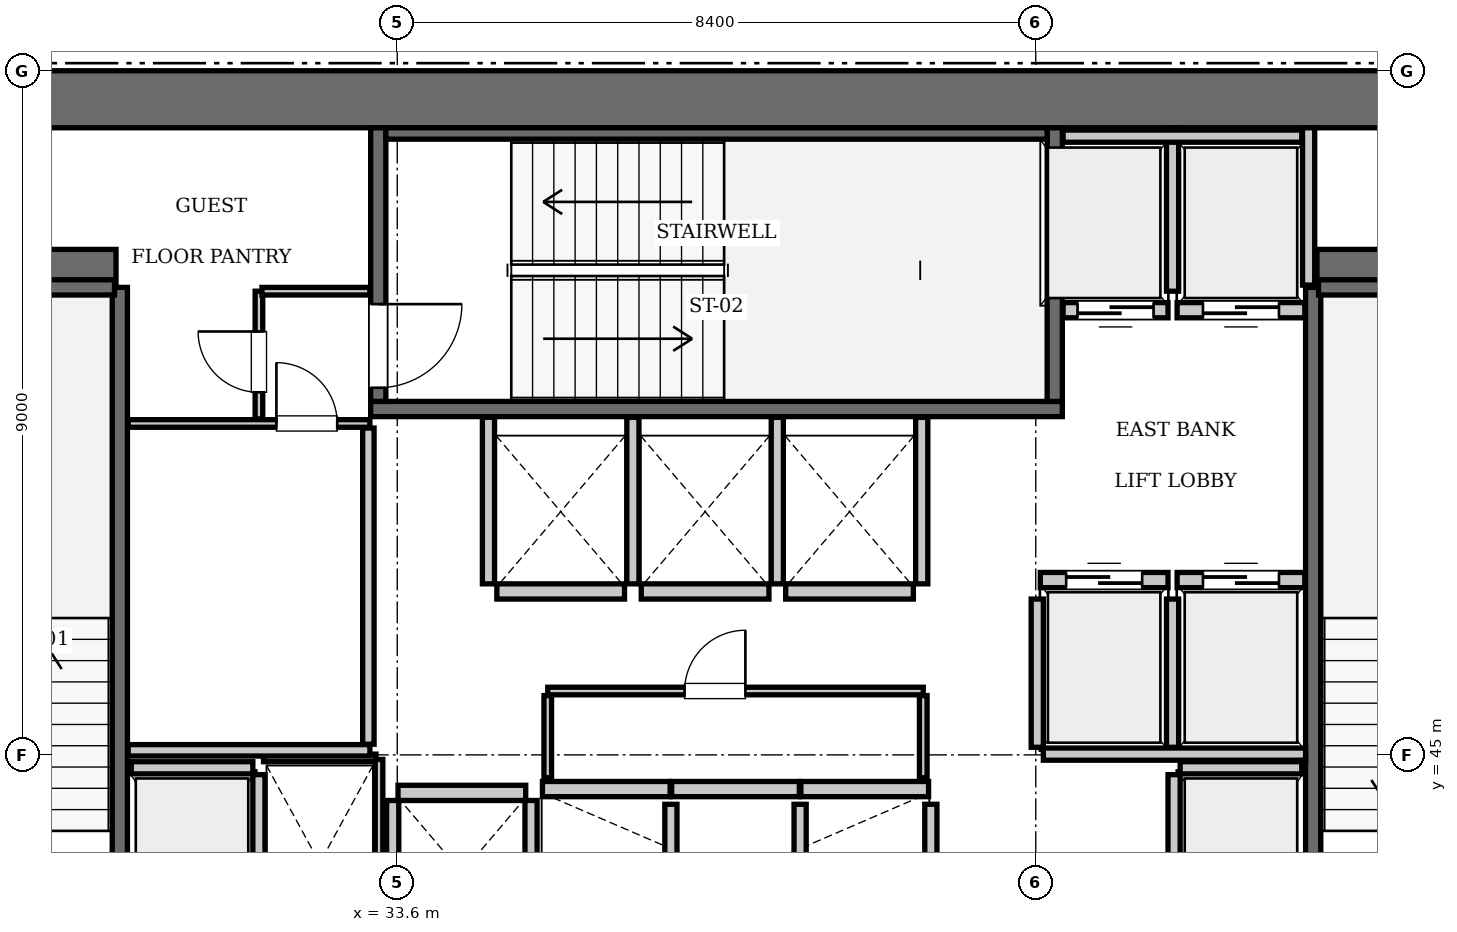
"""IFC4 building model, lengths in metres.
Left out: names, types, materials, properties, quantities, classifications, styles, units other than length and angle.
Written with IfcOpenShell. Run it as: python <this file> out.ifc"""

import sys

from ifc_helpers import new_model, si_unit, direction, frame, frame_2d, origin, place, context, subcontext, project, spatial, rectangle, extrude, element, fill, save


model = new_model("IFC4")
c1 = context("Model", 3, precision=1e-05, world=origin(), true_north=direction((0.0, 1.0)))
c2 = subcontext(c1, "Body", "Model", "MODEL_VIEW")
j1 = project(units=[si_unit("LENGTHUNIT", "METRE"), si_unit("PLANEANGLEUNIT", "RADIAN")], contexts=[c1])
p1 = place(None, origin())
s1 = spatial("IfcSite", under=j1, at=p1, CompositionType="ELEMENT")
p2 = place(p1, origin())
s2 = spatial("IfcBuilding", under=s1, at=p2, CompositionType="ELEMENT")
p3 = place(p2, frame((0.0, 0.0, 196.7)))
s3 = spatial("IfcBuildingStorey", under=s2, at=p3, CompositionType="ELEMENT", Elevation=196.7)
p4 = place(p3, frame((25.2, 53.625, 0.0), z_axis=(0.0, 0.0, 1.0), x_axis=(1.0, 0.0, 0.0)))
e1 = element("IfcWall", 1, at=p4, inside=s3, PredefinedType="SHEAR", context=c2, shape_type="SweptSolid", body=[
    extrude(rectangle(XDim=25.2, YDim=0.75, at=frame_2d((12.6, 0.0))), origin(), (0.0, 0.0, 1.0), 3.85),
])
for number, where, z_axis, x_axis in (
    (2, (25.95, 51.4, 0.0), (0.0, 0.0, 1.0), (1.0, 0.0, 0.0)),
    (3, (45.7, 51.4, 0.0), (0.0, 0.0, 1.0), (1.0, 0.0, 0.0)),
):
    element("IfcWall", number, at=place(p3, frame(where, z_axis=z_axis, x_axis=x_axis)), inside=s3, PredefinedType="SHEAR", context=c2, shape_type="SweptSolid", body=[
        extrude(rectangle(XDim=3.95, YDim=0.5, at=frame_2d((1.975, 0.0))), origin(), (0.0, 0.0, 1.0), 3.85),
    ])
p5 = place(p3, frame((29.95, 42.15, 0.0), z_axis=(0.0, 0.0, 1.0), x_axis=(0.0, 1.0, 0.0)))
e4 = element("IfcWall", 4, at=p5, inside=s3, PredefinedType="SOLIDWALL", context=c2, shape_type="SweptSolid", body=[
    extrude(rectangle(XDim=9.0, YDim=0.2, at=frame_2d((4.5, 0.0))), origin(), (0.0, 0.0, 1.0), 3.61),
])
p6 = place(p3, frame((26.38, 51.15, 0.0), z_axis=(0.0, 0.0, 1.0), x_axis=(1.0, 0.0, 0.0)))
e5 = element("IfcWall", 5, at=p6, inside=s3, PredefinedType="SOLIDWALL", context=c2, shape_type="SweptSolid", body=[
    extrude(rectangle(XDim=3.5, YDim=0.2, at=frame_2d((1.75, 0.0))), origin(), (0.0, 0.0, 1.0), 3.61),
])
p7 = place(p3, frame((33.25, 49.55, 0.0), z_axis=(0.0, 0.0, 1.0), x_axis=(1.0, 0.0, 0.0)))
e6 = element("IfcWall", 6, at=p7, inside=s3, PredefinedType="SOLIDWALL", context=c2, shape_type="SweptSolid", body=[
    extrude(rectangle(XDim=9.1, YDim=0.2, at=frame_2d((4.55, 0.0))), origin(), (0.0, 0.0, 1.0), 3.61),
])
p8 = place(p3, frame((42.25, 49.65, 0.0), z_axis=(0.0, 0.0, 1.0), x_axis=(0.0, 1.0, 0.0)))
e7 = element("IfcWall", 7, at=p8, inside=s3, PredefinedType="SOLIDWALL", context=c2, shape_type="SweptSolid", body=[
    extrude(rectangle(XDim=3.6, YDim=0.2, at=frame_2d((1.8, 0.0))), origin(), (0.0, 0.0, 1.0), 3.61),
])
p9 = place(p3, frame((33.35, 49.65, 0.0), z_axis=(0.0, 0.0, 1.0), x_axis=(0.0, 1.0, 0.0)))
e8 = element("IfcWall", 8, at=p9, inside=s3, PredefinedType="SOLIDWALL", context=c2, shape_type="SweptSolid", body=[
    extrude(rectangle(XDim=3.6, YDim=0.2, at=frame_2d((1.8, 0.0))), origin(), (0.0, 0.0, 1.0), 3.61),
])
p10 = place(p9, frame((0.18, 0.0, 0.0)))
e9 = element("IfcOpeningElement", 9, at=p10, cuts=e8, PredefinedType="OPENING", context=c2, shape_type="SweptSolid", body=[
    extrude(rectangle(XDim=1.1, YDim=2.15, at=frame_2d((0.55, 1.075))), frame((0.0, 0.11, 0.0), z_axis=(0.0, -1.0, 0.0), x_axis=(1.0, 0.0, 0.0)), (0.0, 0.0, 1.0), 0.22),
])
p11 = place(p3, frame((33.45, 53.175, 0.0), z_axis=(0.0, 0.0, 1.0), x_axis=(1.0, 0.0, 0.0)))
e10 = element("IfcWall", 10, at=p11, inside=s3, PredefinedType="SOLIDWALL", context=c2, shape_type="SweptSolid", body=[
    extrude(rectangle(XDim=8.7, YDim=0.15, at=frame_2d((4.35, 0.0))), origin(), (0.0, 0.0, 1.0), 3.61),
])
p12 = place(p3, frame((45.65, 42.15, 0.0), z_axis=(0.0, 0.0, 1.0), x_axis=(0.0, 1.0, 0.0)))
e11 = element("IfcWall", 11, at=p12, inside=s3, PredefinedType="SOLIDWALL", context=c2, shape_type="SweptSolid", body=[
    extrude(rectangle(XDim=9.0, YDim=0.2, at=frame_2d((4.5, 0.0))), origin(), (0.0, 0.0, 1.0), 3.61),
])
p13 = place(p3, frame((45.72, 51.15, 0.0), z_axis=(0.0, 0.0, 1.0), x_axis=(1.0, 0.0, 0.0)))
e12 = element("IfcWall", 12, at=p13, inside=s3, PredefinedType="SOLIDWALL", context=c2, shape_type="SweptSolid", body=[
    extrude(rectangle(XDim=3.5, YDim=0.2, at=frame_2d((1.75, 0.0))), origin(), (0.0, 0.0, 1.0), 3.61),
])
p14 = place(p3, frame((42.06, 47.3, 0.0), z_axis=(0.0, 0.0, 1.0), x_axis=(1.0, 0.0, 0.0)))
e13 = element("IfcWall", 13, at=p14, inside=s3, PredefinedType="SOLIDWALL", context=c2, shape_type="SweptSolid", body=[
    extrude(rectangle(XDim=1.68, YDim=0.2, at=frame_2d((0.84, 0.0))), origin(), (0.0, 0.0, 1.0), 3.61),
])
p15 = place(p14, frame((0.34, 0.0, 0.0)))
e14 = element("IfcOpeningElement", 14, at=p15, cuts=e13, PredefinedType="OPENING", context=c2, shape_type="SweptSolid", body=[
    extrude(rectangle(XDim=1.0, YDim=2.15, at=frame_2d((0.5, 1.075))), frame((0.0, 0.11, 0.0), z_axis=(0.0, -1.0, 0.0), x_axis=(1.0, 0.0, 0.0)), (0.0, 0.0, 1.0), 0.22),
])
p16 = place(p3, frame((43.86, 47.3, 0.0), z_axis=(0.0, 0.0, 1.0), x_axis=(1.0, 0.0, 0.0)))
e15 = element("IfcWall", 15, at=p16, inside=s3, PredefinedType="SOLIDWALL", context=c2, shape_type="SweptSolid", body=[
    extrude(rectangle(XDim=1.68, YDim=0.2, at=frame_2d((0.84, 0.0))), origin(), (0.0, 0.0, 1.0), 3.61),
])
p17 = place(p16, frame((0.34, 0.0, 0.0)))
e16 = element("IfcOpeningElement", 16, at=p17, cuts=e15, PredefinedType="OPENING", context=c2, shape_type="SweptSolid", body=[
    extrude(rectangle(XDim=1.0, YDim=2.15, at=frame_2d((0.5, 1.075))), frame((0.0, 0.11, 0.0), z_axis=(0.0, -1.0, 0.0), x_axis=(1.0, 0.0, 0.0)), (0.0, 0.0, 1.0), 0.22),
])
p18 = place(p3, frame((42.36, 50.85, 0.0), z_axis=(0.0, 0.0, 1.0), x_axis=(1.0, 0.0, 0.0)))
e17 = element("IfcWall", 17, at=p18, inside=s3, PredefinedType="SOLIDWALL", context=c2, shape_type="SweptSolid", body=[
    extrude(rectangle(XDim=1.38, YDim=0.2, at=frame_2d((0.69, 0.0))), origin(), (0.0, 0.0, 1.0), 3.61),
])
p19 = place(p18, frame((0.19, 0.0, 0.0)))
e18 = element("IfcOpeningElement", 18, at=p19, cuts=e17, PredefinedType="OPENING", context=c2, shape_type="SweptSolid", body=[
    extrude(rectangle(XDim=1.0, YDim=2.15, at=frame_2d((0.5, 1.075))), frame((0.0, 0.11, 0.0), z_axis=(0.0, -1.0, 0.0), x_axis=(1.0, 0.0, 0.0)), (0.0, 0.0, 1.0), 0.22),
])
p20 = place(p3, frame((43.86, 50.85, 0.0), z_axis=(0.0, 0.0, 1.0), x_axis=(1.0, 0.0, 0.0)))
e19 = element("IfcWall", 19, at=p20, inside=s3, PredefinedType="SOLIDWALL", context=c2, shape_type="SweptSolid", body=[
    extrude(rectangle(XDim=1.68, YDim=0.2, at=frame_2d((0.84, 0.0))), origin(), (0.0, 0.0, 1.0), 3.61),
])
p21 = place(p20, frame((0.34, 0.0, 0.0)))
e20 = element("IfcOpeningElement", 20, at=p21, cuts=e19, PredefinedType="OPENING", context=c2, shape_type="SweptSolid", body=[
    extrude(rectangle(XDim=1.0, YDim=2.15, at=frame_2d((0.5, 1.075))), frame((0.0, 0.11, 0.0), z_axis=(0.0, -1.0, 0.0), x_axis=(1.0, 0.0, 0.0)), (0.0, 0.0, 1.0), 0.22),
])
for number, where, z_axis, x_axis in (
    (21, (35.51, 44.55, 0.0), (0.0, 0.0, 1.0), (1.0, 0.0, 0.0)),
    (22, (37.21, 44.55, 0.0), (0.0, 0.0, 1.0), (1.0, 0.0, 0.0)),
):
    element("IfcWall", number, at=place(p3, frame(where, z_axis=z_axis, x_axis=x_axis)), inside=s3, PredefinedType="SOLIDWALL", context=c2, shape_type="SweptSolid", body=[
        extrude(rectangle(XDim=1.68, YDim=0.2, at=frame_2d((0.84, 0.0))), origin(), (0.0, 0.0, 1.0), 3.61),
    ])
for number, where, z_axis, x_axis in (
    (23, (38.91, 44.55, 0.0), (0.0, 0.0, 1.0), (1.0, 0.0, 0.0)),
    (24, (34.91, 47.15, 0.0), (0.0, 0.0, 1.0), (1.0, 0.0, 0.0)),
):
    element("IfcWall", number, at=place(p3, frame(where, z_axis=z_axis, x_axis=x_axis)), inside=s3, PredefinedType="SOLIDWALL", context=c2, shape_type="SweptSolid", body=[
        extrude(rectangle(XDim=1.68, YDim=0.2, at=frame_2d((0.84, 0.0))), origin(), (0.0, 0.0, 1.0), 3.61),
    ])
for number, where, z_axis, x_axis in (
    (25, (36.81, 47.15, 0.0), (0.0, 0.0, 1.0), (1.0, 0.0, 0.0)),
    (26, (38.71, 47.15, 0.0), (0.0, 0.0, 1.0), (1.0, 0.0, 0.0)),
    (27, (33.61, 44.5, 0.0), (0.0, 0.0, 1.0), (1.0, 0.0, 0.0)),
):
    element("IfcWall", number, at=place(p3, frame(where, z_axis=z_axis, x_axis=x_axis)), inside=s3, PredefinedType="SOLIDWALL", context=c2, shape_type="SweptSolid", body=[
        extrude(rectangle(XDim=1.68, YDim=0.2, at=frame_2d((0.84, 0.0))), origin(), (0.0, 0.0, 1.0), 3.61),
    ])
p22 = place(p3, frame((30.1, 44.83, 0.0), z_axis=(0.0, 0.0, 1.0), x_axis=(1.0, 0.0, 0.0)))
e28 = element("IfcWall", 28, at=p22, inside=s3, PredefinedType="SOLIDWALL", context=c2, shape_type="SweptSolid", body=[
    extrude(rectangle(XDim=1.6, YDim=0.16, at=frame_2d((0.8, 0.0))), origin(), (0.0, 0.0, 1.0), 3.61),
])
p23 = place(p3, frame((31.78, 42.15, 0.0), z_axis=(0.0, 0.0, 1.0), x_axis=(0.0, 1.0, 0.0)))
e29 = element("IfcWall", 29, at=p23, inside=s3, PredefinedType="SOLIDWALL", context=c2, shape_type="SweptSolid", body=[
    extrude(rectangle(XDim=2.59, YDim=0.16, at=frame_2d((1.295, 0.0))), origin(), (0.0, 0.0, 1.0), 3.61),
])
p24 = place(p3, frame((43.9, 44.83, 0.0), z_axis=(0.0, 0.0, 1.0), x_axis=(1.0, 0.0, 0.0)))
e30 = element("IfcWall", 30, at=p24, inside=s3, PredefinedType="SOLIDWALL", context=c2, shape_type="SweptSolid", body=[
    extrude(rectangle(XDim=1.6, YDim=0.16, at=frame_2d((0.8, 0.0))), origin(), (0.0, 0.0, 1.0), 3.61),
])
p25 = place(p3, frame((43.82, 42.15, 0.0), z_axis=(0.0, 0.0, 1.0), x_axis=(0.0, 1.0, 0.0)))
e31 = element("IfcWall", 31, at=p25, inside=s3, PredefinedType="SOLIDWALL", context=c2, shape_type="SweptSolid", body=[
    extrude(rectangle(XDim=2.59, YDim=0.16, at=frame_2d((1.295, 0.0))), origin(), (0.0, 0.0, 1.0), 3.61),
])
for number, where, z_axis, x_axis in (
    (32, (42.02, 45.1, 0.0), (0.0, 0.0, 1.0), (0.0, 1.0, 0.0)),
    (33, (43.8, 45.1, 0.0), (0.0, 0.0, 1.0), (0.0, 1.0, 0.0)),
):
    element("IfcWall", number, at=place(p3, frame(where, z_axis=z_axis, x_axis=x_axis)), inside=s3, PredefinedType="SOLIDWALL", context=c2, shape_type="SweptSolid", body=[
        extrude(rectangle(XDim=1.95, YDim=0.16, at=frame_2d((0.975, 0.0))), origin(), (0.0, 0.0, 1.0), 3.61),
    ])
p26 = place(p3, frame((42.1, 45.01, 0.0), z_axis=(0.0, 0.0, 1.0), x_axis=(1.0, 0.0, 0.0)))
e34 = element("IfcWall", 34, at=p26, inside=s3, PredefinedType="SOLIDWALL", context=c2, shape_type="SweptSolid", body=[
    extrude(rectangle(XDim=3.45, YDim=0.16, at=frame_2d((1.725, 0.0))), origin(), (0.0, 0.0, 1.0), 3.61),
])
p27 = place(p3, frame((45.59, 51.18, 0.0), z_axis=(0.0, 0.0, 1.0), x_axis=(0.0, 1.0, 0.0)))
e35 = element("IfcWall", 35, at=p27, inside=s3, PredefinedType="SOLIDWALL", context=c2, shape_type="SweptSolid", body=[
    extrude(rectangle(XDim=2.07, YDim=0.16, at=frame_2d((1.035, 0.0))), origin(), (0.0, 0.0, 1.0), 3.61),
])
p28 = place(p3, frame((43.8, 51.1, 0.0), z_axis=(0.0, 0.0, 1.0), x_axis=(0.0, 1.0, 0.0)))
e36 = element("IfcWall", 36, at=p28, inside=s3, PredefinedType="SOLIDWALL", context=c2, shape_type="SweptSolid", body=[
    extrude(rectangle(XDim=2.15, YDim=0.16, at=frame_2d((1.075, 0.0))), origin(), (0.0, 0.0, 1.0), 3.61),
])
p29 = place(p3, frame((42.36, 53.14, 0.0), z_axis=(0.0, 0.0, 1.0), x_axis=(1.0, 0.0, 0.0)))
e37 = element("IfcWall", 37, at=p29, inside=s3, PredefinedType="SOLIDWALL", context=c2, shape_type="SweptSolid", body=[
    extrude(rectangle(XDim=3.14, YDim=0.16, at=frame_2d((1.57, 0.0))), origin(), (0.0, 0.0, 1.0), 3.61),
])
for number, where, z_axis, x_axis in (
    (38, (37.2, 42.15, 0.0), (0.0, 0.0, 1.0), (0.0, 1.0, 0.0)),
    (39, (38.9, 42.15, 0.0), (0.0, 0.0, 1.0), (0.0, 1.0, 0.0)),
    (40, (40.62, 42.15, 0.0), (0.0, 0.0, 1.0), (0.0, 1.0, 0.0)),
):
    element("IfcWall", number, at=place(p3, frame(where, z_axis=z_axis, x_axis=x_axis)), inside=s3, PredefinedType="SOLIDWALL", context=c2, shape_type="SweptSolid", body=[
        extrude(rectangle(XDim=2.2, YDim=0.16, at=frame_2d((1.1, 0.0))), origin(), (0.0, 0.0, 1.0), 3.61),
    ])
for number, where, z_axis, x_axis in (
    (41, (34.8, 47.25, 0.0), (0.0, 0.0, 1.0), (0.0, 1.0, 0.0)),
    (42, (36.7, 47.25, 0.0), (0.0, 0.0, 1.0), (0.0, 1.0, 0.0)),
    (43, (38.6, 47.25, 0.0), (0.0, 0.0, 1.0), (0.0, 1.0, 0.0)),
    (44, (40.5, 47.25, 0.0), (0.0, 0.0, 1.0), (0.0, 1.0, 0.0)),
):
    element("IfcWall", number, at=place(p3, frame(where, z_axis=z_axis, x_axis=x_axis)), inside=s3, PredefinedType="SOLIDWALL", context=c2, shape_type="SweptSolid", body=[
        extrude(rectangle(XDim=2.19, YDim=0.16, at=frame_2d((1.095, 0.0))), origin(), (0.0, 0.0, 1.0), 3.61),
    ])
for number, where, z_axis, x_axis in (
    (45, (33.54, 42.15, 0.0), (0.0, 0.0, 1.0), (0.0, 1.0, 0.0)),
    (46, (35.36, 42.15, 0.0), (0.0, 0.0, 1.0), (0.0, 1.0, 0.0)),
):
    element("IfcWall", number, at=place(p3, frame(where, z_axis=z_axis, x_axis=x_axis)), inside=s3, PredefinedType="SOLIDWALL", context=c2, shape_type="SweptSolid", body=[
        extrude(rectangle(XDim=2.25, YDim=0.16, at=frame_2d((1.125, 0.0))), origin(), (0.0, 0.0, 1.0), 3.61),
    ])
p30 = place(p3, frame((31.84, 44.96, 0.0), z_axis=(0.0, 0.0, 1.0), x_axis=(1.0, 0.0, 0.0)))
e47 = element("IfcWall", 47, at=p30, inside=s3, PredefinedType="PARTITIONING", context=c2, shape_type="SweptSolid", body=[
    extrude(rectangle(XDim=1.48, YDim=0.1, at=frame_2d((0.74, 0.0))), origin(), (0.0, 0.0, 1.0), 3.61),
])
p31 = place(p3, frame((33.36, 42.21, 0.0), z_axis=(0.0, 0.0, 1.0), x_axis=(0.0, 1.0, 0.0)))
e48 = element("IfcWall", 48, at=p31, inside=s3, PredefinedType="PARTITIONING", context=c2, shape_type="SweptSolid", body=[
    extrude(rectangle(XDim=2.73, YDim=0.1, at=frame_2d((1.365, 0.0))), origin(), (0.0, 0.0, 1.0), 3.61),
])
p32 = place(p3, frame((35.58, 45.84, 0.0), z_axis=(0.0, 0.0, 1.0), x_axis=(1.0, 0.0, 0.0)))
e49 = element("IfcWall", 49, at=p32, inside=s3, PredefinedType="PARTITIONING", context=c2, shape_type="SweptSolid", body=[
    extrude(rectangle(XDim=4.94, YDim=0.1, at=frame_2d((2.47, 0.0))), origin(), (0.0, 0.0, 1.0), 3.61),
])
p33 = place(p32, frame((1.8, 0.0, 0.0)))
e50 = element("IfcOpeningElement", 50, at=p33, cuts=e49, PredefinedType="OPENING", context=c2, shape_type="SweptSolid", body=[
    extrude(rectangle(XDim=0.8, YDim=2.05, at=frame_2d((0.4, 1.025))), frame((0.0, 0.06, 0.0), z_axis=(0.0, -1.0, 0.0), x_axis=(1.0, 0.0, 0.0)), (0.0, 0.0, 1.0), 0.12),
])
for number, where, z_axis, x_axis in (
    (51, (35.58, 44.7, 0.0), (0.0, 0.0, 1.0), (0.0, 1.0, 0.0)),
    (52, (40.52, 44.7, 0.0), (0.0, 0.0, 1.0), (0.0, 1.0, 0.0)),
):
    element("IfcWall", number, at=place(p3, frame(where, z_axis=z_axis, x_axis=x_axis)), inside=s3, PredefinedType="PARTITIONING", context=c2, shape_type="SweptSolid", body=[
        extrude(rectangle(XDim=1.08, YDim=0.1, at=frame_2d((0.54, 0.0))), origin(), (0.0, 0.0, 1.0), 3.61),
    ])
p34 = place(p3, frame((30.06, 45.06, 0.0), z_axis=(0.0, 0.0, 1.0), x_axis=(1.0, 0.0, 0.0)))
e53 = element("IfcWall", 53, at=p34, inside=s3, PredefinedType="PARTITIONING", context=c2, shape_type="SweptSolid", body=[
    extrude(rectangle(XDim=3.18, YDim=0.15, at=frame_2d((1.59, 0.0))), origin(), (0.0, 0.0, 1.0), 3.61),
])
p35 = place(p3, frame((33.22, 45.14, 0.0), z_axis=(0.0, 0.0, 1.0), x_axis=(0.0, 1.0, 0.0)))
e54 = element("IfcWall", 54, at=p35, inside=s3, PredefinedType="PARTITIONING", context=c2, shape_type="SweptSolid", body=[
    extrude(rectangle(XDim=4.16, YDim=0.15, at=frame_2d((2.08, 0.0))), origin(), (0.0, 0.0, 1.0), 3.61),
])
p36 = place(p3, frame((30.06, 49.36, 0.0), z_axis=(0.0, 0.0, 1.0), x_axis=(1.0, 0.0, 0.0)))
e55 = element("IfcWall", 55, at=p36, inside=s3, PredefinedType="PARTITIONING", context=c2, shape_type="SweptSolid", body=[
    extrude(rectangle(XDim=3.18, YDim=0.1, at=frame_2d((1.59, 0.0))), origin(), (0.0, 0.0, 1.0), 3.61),
])
p37 = place(p36, frame((1.95, 0.0, 0.0)))
e56 = element("IfcOpeningElement", 56, at=p37, cuts=e55, PredefinedType="OPENING", context=c2, shape_type="SweptSolid", body=[
    extrude(rectangle(XDim=0.8, YDim=2.05, at=frame_2d((0.4, 1.025))), frame((0.0, 0.06, 0.0), z_axis=(0.0, -1.0, 0.0), x_axis=(1.0, 0.0, 0.0)), (0.0, 0.0, 1.0), 0.12),
])
p38 = place(p3, frame((31.78, 49.42, 0.0), z_axis=(0.0, 0.0, 1.0), x_axis=(0.0, 1.0, 0.0)))
e57 = element("IfcWall", 57, at=p38, inside=s3, PredefinedType="PARTITIONING", context=c2, shape_type="SweptSolid", body=[
    extrude(rectangle(XDim=1.68, YDim=0.1, at=frame_2d((0.84, 0.0))), origin(), (0.0, 0.0, 1.0), 3.61),
])
p39 = place(p38, frame((0.35, 0.0, 0.0)))
e58 = element("IfcOpeningElement", 58, at=p39, cuts=e57, PredefinedType="OPENING", context=c2, shape_type="SweptSolid", body=[
    extrude(rectangle(XDim=0.8, YDim=2.05, at=frame_2d((0.4, 1.025))), frame((0.0, 0.06, 0.0), z_axis=(0.0, -1.0, 0.0), x_axis=(1.0, 0.0, 0.0)), (0.0, 0.0, 1.0), 0.12),
])
p40 = place(p3, frame((31.82, 51.1, 0.0), z_axis=(0.0, 0.0, 1.0), x_axis=(1.0, 0.0, 0.0)))
e59 = element("IfcWall", 59, at=p40, inside=s3, PredefinedType="PARTITIONING", context=c2, shape_type="SweptSolid", body=[
    extrude(rectangle(XDim=1.42, YDim=0.1, at=frame_2d((0.71, 0.0))), origin(), (0.0, 0.0, 1.0), 3.61),
])
p41 = place(p10, frame((1.1, 0.0, 0.0), z_axis=(0.0, 0.0, 1.0), x_axis=(-1.0, 0.0, 0.0)))
e60 = element("IfcDoor", 60, at=p41, inside=s3, OperationType="SINGLE_SWING_LEFT", PredefinedType="DOOR", context=c2, shape_type="SweptSolid", body=[
    extrude(rectangle(XDim=1.1, YDim=2.15, at=frame_2d((0.55, 1.075))), frame((0.0, 0.025, 0.0), z_axis=(0.0, -1.0, 0.0), x_axis=(1.0, 0.0, 0.0)), (0.0, 0.0, 1.0), 0.05),
])
fill(e9, e60)
p42 = place(p15, origin())
e61 = element("IfcDoor", 61, at=p42, inside=s3, OperationType="SLIDING_TO_LEFT", PredefinedType="DOOR", context=c2, shape_type="SweptSolid", body=[
    extrude(rectangle(XDim=1.0, YDim=2.15, at=frame_2d((0.5, 1.075))), frame((0.0, 0.025, 0.0), z_axis=(0.0, -1.0, 0.0), x_axis=(1.0, 0.0, 0.0)), (0.0, 0.0, 1.0), 0.05),
])
fill(e14, e61)
p43 = place(p17, origin())
e62 = element("IfcDoor", 62, at=p43, inside=s3, OperationType="SLIDING_TO_LEFT", PredefinedType="DOOR", context=c2, shape_type="SweptSolid", body=[
    extrude(rectangle(XDim=1.0, YDim=2.15, at=frame_2d((0.5, 1.075))), frame((0.0, 0.025, 0.0), z_axis=(0.0, -1.0, 0.0), x_axis=(1.0, 0.0, 0.0)), (0.0, 0.0, 1.0), 0.05),
])
fill(e16, e62)
p44 = place(p19, frame((1.0, 0.0, 0.0), z_axis=(0.0, 0.0, 1.0), x_axis=(-1.0, 0.0, 0.0)))
e63 = element("IfcDoor", 63, at=p44, inside=s3, OperationType="SLIDING_TO_LEFT", PredefinedType="DOOR", context=c2, shape_type="SweptSolid", body=[
    extrude(rectangle(XDim=1.0, YDim=2.15, at=frame_2d((0.5, 1.075))), frame((0.0, 0.025, 0.0), z_axis=(0.0, -1.0, 0.0), x_axis=(1.0, 0.0, 0.0)), (0.0, 0.0, 1.0), 0.05),
])
fill(e18, e63)
p45 = place(p21, frame((1.0, 0.0, 0.0), z_axis=(0.0, 0.0, 1.0), x_axis=(-1.0, 0.0, 0.0)))
e64 = element("IfcDoor", 64, at=p45, inside=s3, OperationType="SLIDING_TO_LEFT", PredefinedType="DOOR", context=c2, shape_type="SweptSolid", body=[
    extrude(rectangle(XDim=1.0, YDim=2.15, at=frame_2d((0.5, 1.075))), frame((0.0, 0.025, 0.0), z_axis=(0.0, -1.0, 0.0), x_axis=(1.0, 0.0, 0.0)), (0.0, 0.0, 1.0), 0.05),
])
fill(e20, e64)
p46 = place(p33, origin())
e65 = element("IfcDoor", 65, at=p46, inside=s3, OperationType="SINGLE_SWING_RIGHT", PredefinedType="DOOR", context=c2, shape_type="SweptSolid", body=[
    extrude(rectangle(XDim=0.8, YDim=2.05, at=frame_2d((0.4, 1.025))), frame((0.0, 0.025, 0.0), z_axis=(0.0, -1.0, 0.0), x_axis=(1.0, 0.0, 0.0)), (0.0, 0.0, 1.0), 0.05),
])
fill(e50, e65)
p47 = place(p37, origin())
e66 = element("IfcDoor", 66, at=p47, inside=s3, OperationType="SINGLE_SWING_LEFT", PredefinedType="DOOR", context=c2, shape_type="SweptSolid", body=[
    extrude(rectangle(XDim=0.8, YDim=2.05, at=frame_2d((0.4, 1.025))), frame((0.0, 0.025, 0.0), z_axis=(0.0, -1.0, 0.0), x_axis=(1.0, 0.0, 0.0)), (0.0, 0.0, 1.0), 0.05),
])
fill(e56, e66)
p48 = place(p39, origin())
e67 = element("IfcDoor", 67, at=p48, inside=s3, OperationType="SINGLE_SWING_RIGHT", PredefinedType="DOOR", context=c2, shape_type="SweptSolid", body=[
    extrude(rectangle(XDim=0.8, YDim=2.05, at=frame_2d((0.4, 1.025))), frame((0.0, 0.025, 0.0), z_axis=(0.0, -1.0, 0.0), x_axis=(1.0, 0.0, 0.0)), (0.0, 0.0, 1.0), 0.05),
])
fill(e58, e67)
save(model, sys.argv[1])
